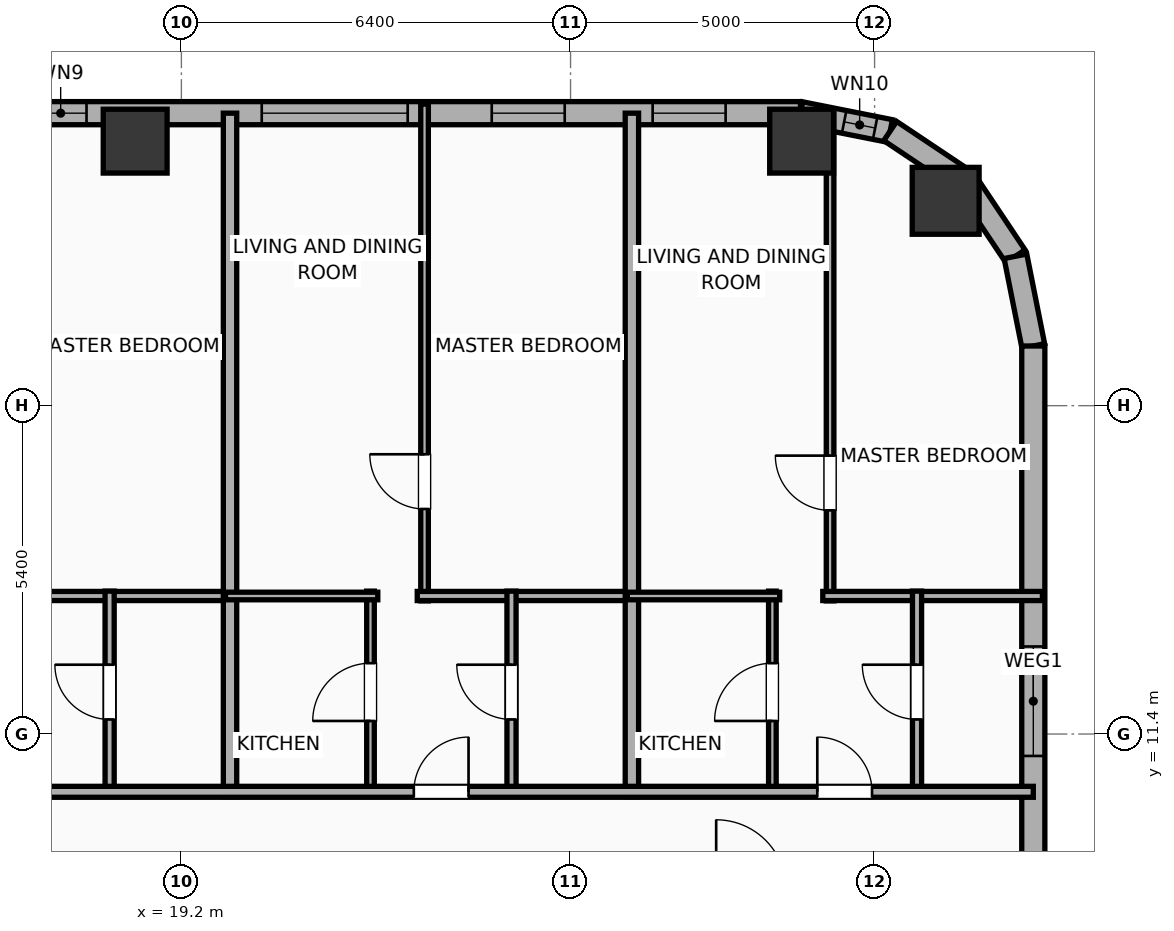
"""IFC4 building model, lengths in metres.
Left out: names, types, materials, properties, quantities, classifications, styles, units other than length and angle.
Written with IfcOpenShell. Run it as: python <this file> out.ifc"""

import sys

from ifc_helpers import new_model, si_unit, direction, frame, frame_2d, origin, origin_2d, place, context, subcontext, project, spatial, rectangle, hollow_rectangle, hollow_circle, extrude, element, fill, save


model = new_model("IFC4")
c1 = context("Model", 3, precision=1e-05, world=origin(), true_north=direction((0.0, 1.0)))
c2 = subcontext(c1, "Body", "Model", "MODEL_VIEW")
j1 = project(units=[si_unit("LENGTHUNIT", "METRE"), si_unit("PLANEANGLEUNIT", "RADIAN")], contexts=[c1])
p1 = place(None, origin())
s1 = spatial("IfcSite", under=j1, at=p1, CompositionType="ELEMENT")
p2 = place(p1, origin())
s2 = spatial("IfcBuilding", under=s1, at=p2, CompositionType="ELEMENT")
p3 = place(p2, frame((0.0, 0.0, 117.0)))
s3 = spatial("IfcBuildingStorey", under=s2, at=p3, CompositionType="ELEMENT", Elevation=117.0)
p4 = place(p3, frame((31.769, 20.169, 0.0), z_axis=(0.0, 0.0, 1.0), x_axis=(1.0, 0.0, 0.0)))
e1 = element("IfcColumn", 1, at=p4, inside=s3, PredefinedType="COLUMN", context=c2, shape_type="SweptSolid", body=[
    extrude(hollow_circle(Radius=0.55, WallThickness=0.036, at=origin_2d()), origin(), (0.0, 0.0, 1.0), 3.9),
])
for number, where, z_axis, x_axis in (
    (2, (29.4, 21.15, 0.0), (0.0, 0.0, 1.0), (1.0, 0.0, 0.0)),
    (3, (18.44, 21.15, 0.0), (0.0, 0.0, 1.0), (1.0, 0.0, 0.0)),
):
    element("IfcColumn", number, at=place(p3, frame(where, z_axis=z_axis, x_axis=x_axis)), inside=s3, PredefinedType="COLUMN", context=c2, shape_type="SweptSolid", body=[
        extrude(hollow_rectangle(XDim=1.05, YDim=1.05, WallThickness=0.036, at=origin_2d()), origin(), (0.0, 0.0, 1.0), 3.9),
    ])
p5 = place(p3, frame((10.762, 21.61, 0.0), z_axis=(0.0, 0.0, 1.0), x_axis=(1.0, 0.0, 0.0)))
e4 = element("IfcWall", 4, at=p5, inside=s3, PredefinedType="ELEMENTEDWALL", context=c2, shape_type="SweptSolid", body=[
    extrude(rectangle(XDim=18.619, YDim=0.38, at=frame_2d((9.31, 0.0))), origin(), (0.0, 0.0, 1.0), 3.65),
])
p6 = place(p5, frame((9.76, 0.0, 0.75)))
e5 = element("IfcOpeningElement", 5, at=p6, cuts=e4, PredefinedType="OPENING", context=c2, shape_type="SweptSolid", body=[
    extrude(rectangle(XDim=2.4, YDim=2.1, at=frame_2d((1.2, 1.05))), frame((0.0, 0.2, 0.0), z_axis=(0.0, -1.0, 0.0), x_axis=(1.0, 0.0, 0.0)), (0.0, 0.0, 1.0), 0.4),
])
p7 = place(p5, frame((2.952, 0.0, 0.75)))
e6 = element("IfcOpeningElement", 6, at=p7, cuts=e4, PredefinedType="OPENING", context=c2, shape_type="SweptSolid", body=[
    extrude(rectangle(XDim=1.2, YDim=2.05, at=frame_2d((0.6, 1.025))), frame((0.0, 0.2, 0.0), z_axis=(0.0, -1.0, 0.0), x_axis=(1.0, 0.0, 0.0)), (0.0, 0.0, 1.0), 0.4),
])
p8 = place(p5, frame((6.028, 0.0, 0.75)))
e7 = element("IfcOpeningElement", 7, at=p8, cuts=e4, PredefinedType="OPENING", context=c2, shape_type="SweptSolid", body=[
    extrude(rectangle(XDim=0.85, YDim=2.05, at=frame_2d((0.425, 1.025))), frame((0.0, 0.2, 0.0), z_axis=(0.0, -1.0, 0.0), x_axis=(1.0, 0.0, 0.0)), (0.0, 0.0, 1.0), 0.4),
])
p9 = place(p5, frame((13.542, 0.0, 0.75)))
e8 = element("IfcOpeningElement", 8, at=p9, cuts=e4, PredefinedType="OPENING", context=c2, shape_type="SweptSolid", body=[
    extrude(rectangle(XDim=1.2, YDim=2.05, at=frame_2d((0.6, 1.025))), frame((0.0, 0.2, 0.0), z_axis=(0.0, -1.0, 0.0), x_axis=(1.0, 0.0, 0.0)), (0.0, 0.0, 1.0), 0.4),
])
p10 = place(p5, frame((16.188, 0.0, 0.75)))
e9 = element("IfcOpeningElement", 9, at=p10, cuts=e4, PredefinedType="OPENING", context=c2, shape_type="SweptSolid", body=[
    extrude(rectangle(XDim=1.2, YDim=2.05, at=frame_2d((0.6, 1.025))), frame((0.0, 0.2, 0.0), z_axis=(0.0, -1.0, 0.0), x_axis=(1.0, 0.0, 0.0)), (0.0, 0.0, 1.0), 0.4),
])
p11 = place(p3, frame((29.381, 21.61, 0.0), z_axis=(0.0, 0.0, 1.0), x_axis=(0.980755066645, -0.195242155415, 0.0)))
e10 = element("IfcWall", 10, at=p11, inside=s3, PredefinedType="ELEMENTEDWALL", context=c2, shape_type="SweptSolid", body=[
    extrude(rectangle(XDim=1.504, YDim=0.38, at=frame_2d((0.752, 0.0))), origin(), (0.0, 0.0, 1.0), 3.65),
])
p12 = place(p11, frame((0.732, 0.0, 0.75)))
e11 = element("IfcOpeningElement", 11, at=p12, cuts=e10, PredefinedType="OPENING", context=c2, shape_type="SweptSolid", body=[
    extrude(rectangle(XDim=0.52, YDim=2.05, at=frame_2d((0.26, 1.025))), frame((0.0, 0.2, 0.0), z_axis=(0.0, -1.0, 0.0), x_axis=(1.0, 0.0, 0.0)), (0.0, 0.0, 1.0), 0.4),
])
p13 = place(p3, frame((30.857, 21.316, 0.0), z_axis=(0.0, 0.0, 1.0), x_axis=(0.831468045563, -0.555572577804, 0.0)))
e12 = element("IfcWall", 12, at=p13, inside=s3, PredefinedType="ELEMENTEDWALL", context=c2, shape_type="SweptSolid", body=[
    extrude(rectangle(XDim=1.485, YDim=0.38, at=frame_2d((0.742, 0.0))), origin(), (0.0, 0.0, 1.0), 3.65),
])
p14 = place(p3, frame((32.091, 20.491, 0.0), z_axis=(0.0, 0.0, 1.0), x_axis=(0.555610286119, -0.831442848281, 0.0)))
e13 = element("IfcWall", 13, at=p14, inside=s3, PredefinedType="ELEMENTEDWALL", context=c2, shape_type="SweptSolid", body=[
    extrude(rectangle(XDim=1.485, YDim=0.38, at=frame_2d((0.743, 0.0))), origin(), (0.0, 0.0, 1.0), 3.65),
])
p15 = place(p3, frame((32.917, 19.257, 0.0), z_axis=(0.0, 0.0, 1.0), x_axis=(0.195086038585, -0.980786132421, 0.0)))
e14 = element("IfcWall", 14, at=p15, inside=s3, PredefinedType="ELEMENTEDWALL", context=c2, shape_type="SweptSolid", body=[
    extrude(rectangle(XDim=1.504, YDim=0.38, at=frame_2d((0.752, 0.0))), origin(), (0.0, 0.0, 1.0), 3.65),
])
p16 = place(p3, frame((33.21, 17.781, 0.0), z_axis=(0.0, 0.0, 1.0), x_axis=(0.0, -1.0, 0.0)))
e15 = element("IfcWall", 15, at=p16, inside=s3, PredefinedType="ELEMENTEDWALL", context=c2, shape_type="SweptSolid", body=[
    extrude(rectangle(XDim=11.683, YDim=0.38, at=frame_2d((5.842, 0.0))), origin(), (0.0, 0.0, 1.0), 3.65),
])
p17 = place(p16, frame((4.942, 0.0, 0.75)))
e16 = element("IfcOpeningElement", 16, at=p17, cuts=e15, PredefinedType="OPENING", context=c2, shape_type="SweptSolid", body=[
    extrude(rectangle(XDim=1.8, YDim=2.1, at=frame_2d((0.9, 1.05))), frame((0.0, 0.2, 0.0), z_axis=(0.0, -1.0, 0.0), x_axis=(1.0, 0.0, 0.0)), (0.0, 0.0, 1.0), 0.4),
])
p18 = place(p3, frame((16.47, 13.67, 0.0), z_axis=(0.0, 0.0, 1.0), x_axis=(1.0, 0.0, 0.0)))
e17 = element("IfcWall", 17, at=p18, inside=s3, PredefinedType="PLUMBINGWALL", context=c2, shape_type="SweptSolid", body=[
    extrude(rectangle(XDim=3.605, YDim=0.15, at=frame_2d((1.802, 0.0))), origin(), (0.0, 0.0, 1.0), 3.65),
])
p19 = place(p3, frame((18.02, 10.43, 0.0), z_axis=(0.0, 0.0, 1.0), x_axis=(0.0, 1.0, 0.0)))
e18 = element("IfcWall", 18, at=p19, inside=s3, PredefinedType="PLUMBINGWALL", context=c2, shape_type="SweptSolid", body=[
    extrude(rectangle(XDim=3.32, YDim=0.15, at=frame_2d((1.66, 0.0))), origin(), (0.0, 0.0, 1.0), 3.65),
])
p20 = place(p19, frame((1.21, 0.0, 0.0)))
e19 = element("IfcOpeningElement", 19, at=p20, cuts=e18, PredefinedType="OPENING", context=c2, shape_type="SweptSolid", body=[
    extrude(rectangle(XDim=0.9, YDim=2.05, at=frame_2d((0.45, 1.025))), frame((0.0, 0.085, 0.0), z_axis=(0.0, -1.0, 0.0), x_axis=(1.0, 0.0, 0.0)), (0.0, 0.0, 1.0), 0.17),
])
p21 = place(p3, frame((20.0, 10.37, 0.0), z_axis=(0.0, 0.0, 1.0), x_axis=(0.0, 1.0, 0.0)))
e20 = element("IfcWall", 20, at=p21, inside=s3, PredefinedType="PARTITIONING", context=c2, shape_type="SweptSolid", body=[
    extrude(rectangle(XDim=11.24, YDim=0.22, at=frame_2d((5.62, 0.0))), origin(), (0.0, 0.0, 1.0), 3.65),
])
p22 = place(p3, frame((23.199, 13.59, 0.0), z_axis=(0.0, 0.0, 1.0), x_axis=(0.0, 1.0, 0.0)))
e21 = element("IfcWall", 21, at=p22, inside=s3, PredefinedType="PARTITIONING", context=c2, shape_type="SweptSolid", body=[
    extrude(rectangle(XDim=8.17, YDim=0.125, at=frame_2d((4.085, 0.0))), origin(), (0.0, 0.0, 1.0), 3.65),
])
p23 = place(p22, frame((1.511, 0.0, 0.0)))
e22 = element("IfcOpeningElement", 22, at=p23, cuts=e21, PredefinedType="OPENING", context=c2, shape_type="SweptSolid", body=[
    extrude(rectangle(XDim=0.9, YDim=2.05, at=frame_2d((0.45, 1.025))), frame((0.0, 0.073, 0.0), z_axis=(0.0, -1.0, 0.0), x_axis=(1.0, 0.0, 0.0)), (0.0, 0.0, 1.0), 0.145),
])
p24 = place(p3, frame((23.079, 13.67, 0.0), z_axis=(0.0, 0.0, 1.0), x_axis=(1.0, 0.0, 0.0)))
e23 = element("IfcWall", 23, at=p24, inside=s3, PredefinedType="PLUMBINGWALL", context=c2, shape_type="SweptSolid", body=[
    extrude(rectangle(XDim=3.605, YDim=0.15, at=frame_2d((1.802, 0.0))), origin(), (0.0, 0.0, 1.0), 3.65),
])
p25 = place(p3, frame((22.31, 10.43, 0.0), z_axis=(0.0, 0.0, 1.0), x_axis=(0.0, 1.0, 0.0)))
e24 = element("IfcWall", 24, at=p25, inside=s3, PredefinedType="PARTITIONING", context=c2, shape_type="SweptSolid", body=[
    extrude(rectangle(XDim=3.32, YDim=0.125, at=frame_2d((1.66, 0.0))), origin(), (0.0, 0.0, 1.0), 3.65),
])
p26 = place(p25, frame((1.185, 0.0, 0.0)))
e25 = element("IfcOpeningElement", 25, at=p26, cuts=e24, PredefinedType="OPENING", context=c2, shape_type="SweptSolid", body=[
    extrude(rectangle(XDim=0.95, YDim=2.05, at=frame_2d((0.475, 1.025))), frame((0.0, 0.073, 0.0), z_axis=(0.0, -1.0, 0.0), x_axis=(1.0, 0.0, 0.0)), (0.0, 0.0, 1.0), 0.145),
])
p27 = place(p3, frame((19.925, 13.67, 0.0), z_axis=(0.0, 0.0, 1.0), x_axis=(1.0, 0.0, 0.0)))
e26 = element("IfcWall", 26, at=p27, inside=s3, PredefinedType="PARTITIONING", context=c2, shape_type="SweptSolid", body=[
    extrude(rectangle(XDim=2.505, YDim=0.125, at=frame_2d((1.252, 0.0))), origin(), (0.0, 0.0, 1.0), 3.65),
])
p28 = place(p3, frame((24.629, 10.43, 0.0), z_axis=(0.0, 0.0, 1.0), x_axis=(0.0, 1.0, 0.0)))
e27 = element("IfcWall", 27, at=p28, inside=s3, PredefinedType="PLUMBINGWALL", context=c2, shape_type="SweptSolid", body=[
    extrude(rectangle(XDim=3.32, YDim=0.15, at=frame_2d((1.66, 0.0))), origin(), (0.0, 0.0, 1.0), 3.65),
])
p29 = place(p28, frame((1.21, 0.0, 0.0)))
e28 = element("IfcOpeningElement", 28, at=p29, cuts=e27, PredefinedType="OPENING", context=c2, shape_type="SweptSolid", body=[
    extrude(rectangle(XDim=0.9, YDim=2.05, at=frame_2d((0.45, 1.025))), frame((0.0, 0.085, 0.0), z_axis=(0.0, -1.0, 0.0), x_axis=(1.0, 0.0, 0.0)), (0.0, 0.0, 1.0), 0.17),
])
p30 = place(p3, frame((26.609, 10.37, 0.0), z_axis=(0.0, 0.0, 1.0), x_axis=(0.0, 1.0, 0.0)))
e29 = element("IfcWall", 29, at=p30, inside=s3, PredefinedType="PARTITIONING", context=c2, shape_type="SweptSolid", body=[
    extrude(rectangle(XDim=11.24, YDim=0.22, at=frame_2d((5.62, 0.0))), origin(), (0.0, 0.0, 1.0), 3.65),
])
p31 = place(p3, frame((29.868, 13.59, 0.0), z_axis=(0.0, 0.0, 1.0), x_axis=(0.0, 1.0, 0.0)))
e30 = element("IfcWall", 30, at=p31, inside=s3, PredefinedType="PARTITIONING", context=c2, shape_type="SweptSolid", body=[
    extrude(rectangle(XDim=8.076, YDim=0.125, at=frame_2d((4.038, 0.0))), origin(), (0.0, 0.0, 1.0), 3.65),
])
p32 = place(p31, frame((1.488, 0.0, 0.0)))
e31 = element("IfcOpeningElement", 31, at=p32, cuts=e30, PredefinedType="OPENING", context=c2, shape_type="SweptSolid", body=[
    extrude(rectangle(XDim=0.9, YDim=2.05, at=frame_2d((0.45, 1.025))), frame((0.0, 0.073, 0.0), z_axis=(0.0, -1.0, 0.0), x_axis=(1.0, 0.0, 0.0)), (0.0, 0.0, 1.0), 0.145),
])
p33 = place(p3, frame((29.748, 13.67, 0.0), z_axis=(0.0, 0.0, 1.0), x_axis=(1.0, 0.0, 0.0)))
e32 = element("IfcWall", 32, at=p33, inside=s3, PredefinedType="PLUMBINGWALL", context=c2, shape_type="SweptSolid", body=[
    extrude(rectangle(XDim=3.612, YDim=0.15, at=frame_2d((1.806, 0.0))), origin(), (0.0, 0.0, 1.0), 3.65),
])
p34 = place(p3, frame((28.919, 10.43, 0.0), z_axis=(0.0, 0.0, 1.0), x_axis=(0.0, 1.0, 0.0)))
e33 = element("IfcWall", 33, at=p34, inside=s3, PredefinedType="PARTITIONING", context=c2, shape_type="SweptSolid", body=[
    extrude(rectangle(XDim=3.32, YDim=0.125, at=frame_2d((1.66, 0.0))), origin(), (0.0, 0.0, 1.0), 3.65),
])
p35 = place(p34, frame((1.185, 0.0, 0.0)))
e34 = element("IfcOpeningElement", 34, at=p35, cuts=e33, PredefinedType="OPENING", context=c2, shape_type="SweptSolid", body=[
    extrude(rectangle(XDim=0.95, YDim=2.05, at=frame_2d((0.475, 1.025))), frame((0.0, 0.073, 0.0), z_axis=(0.0, -1.0, 0.0), x_axis=(1.0, 0.0, 0.0)), (0.0, 0.0, 1.0), 0.145),
])
p36 = place(p3, frame((26.534, 13.67, 0.0), z_axis=(0.0, 0.0, 1.0), x_axis=(1.0, 0.0, 0.0)))
e35 = element("IfcWall", 35, at=p36, inside=s3, PredefinedType="PARTITIONING", context=c2, shape_type="SweptSolid", body=[
    extrude(rectangle(XDim=2.505, YDim=0.125, at=frame_2d((1.252, 0.0))), origin(), (0.0, 0.0, 1.0), 3.65),
])
p37 = place(p3, frame((31.298, 10.43, 0.0), z_axis=(0.0, 0.0, 1.0), x_axis=(0.0, 1.0, 0.0)))
e36 = element("IfcWall", 36, at=p37, inside=s3, PredefinedType="PLUMBINGWALL", context=c2, shape_type="SweptSolid", body=[
    extrude(rectangle(XDim=3.32, YDim=0.15, at=frame_2d((1.66, 0.0))), origin(), (0.0, 0.0, 1.0), 3.65),
])
p38 = place(p37, frame((1.21, 0.0, 0.0)))
e37 = element("IfcOpeningElement", 37, at=p38, cuts=e36, PredefinedType="OPENING", context=c2, shape_type="SweptSolid", body=[
    extrude(rectangle(XDim=0.9, YDim=2.05, at=frame_2d((0.45, 1.025))), frame((0.0, 0.085, 0.0), z_axis=(0.0, -1.0, 0.0), x_axis=(1.0, 0.0, 0.0)), (0.0, 0.0, 1.0), 0.17),
])
p39 = place(p3, frame((-29.21, 10.45, 0.0), z_axis=(0.0, 0.0, 1.0), x_axis=(1.0, 0.0, 0.0)))
e38 = element("IfcWall", 38, at=p39, inside=s3, PredefinedType="PARTITIONING", context=c2, shape_type="SweptSolid", body=[
    extrude(rectangle(XDim=62.42, YDim=0.18, at=frame_2d((31.21, 0.0))), origin(), (0.0, 0.0, 1.0), 3.65),
])
p40 = place(p39, frame((3.083, 0.0, 0.0)))
e39 = element("IfcOpeningElement", 39, at=p40, cuts=e38, PredefinedType="OPENING", context=c2, shape_type="SweptSolid", body=[
    extrude(rectangle(XDim=0.9, YDim=2.05, at=frame_2d((0.45, 1.025))), frame((0.0, 0.1, 0.0), z_axis=(0.0, -1.0, 0.0), x_axis=(1.0, 0.0, 0.0)), (0.0, 0.0, 1.0), 0.2),
])
p41 = place(p39, frame((12.052, 0.0, 0.0)))
e40 = element("IfcOpeningElement", 40, at=p41, cuts=e38, PredefinedType="OPENING", context=c2, shape_type="SweptSolid", body=[
    extrude(rectangle(XDim=1.15, YDim=2.05, at=frame_2d((0.575, 1.025))), frame((0.0, 0.1, 0.0), z_axis=(0.0, -1.0, 0.0), x_axis=(1.0, 0.0, 0.0)), (0.0, 0.0, 1.0), 0.2),
])
p42 = place(p39, frame((22.558, 0.0, 0.0)))
e41 = element("IfcOpeningElement", 41, at=p42, cuts=e38, PredefinedType="OPENING", context=c2, shape_type="SweptSolid", body=[
    extrude(rectangle(XDim=1.15, YDim=2.05, at=frame_2d((0.575, 1.025))), frame((0.0, 0.1, 0.0), z_axis=(0.0, -1.0, 0.0), x_axis=(1.0, 0.0, 0.0)), (0.0, 0.0, 1.0), 0.2),
])
p43 = place(p39, frame((33.219, 0.0, 0.0)))
e42 = element("IfcOpeningElement", 42, at=p43, cuts=e38, PredefinedType="OPENING", context=c2, shape_type="SweptSolid", body=[
    extrude(rectangle(XDim=1.15, YDim=2.05, at=frame_2d((0.575, 1.025))), frame((0.0, 0.1, 0.0), z_axis=(0.0, -1.0, 0.0), x_axis=(1.0, 0.0, 0.0)), (0.0, 0.0, 1.0), 0.2),
])
p44 = place(p39, frame((43.725, 0.0, 0.0)))
e43 = element("IfcOpeningElement", 43, at=p44, cuts=e38, PredefinedType="OPENING", context=c2, shape_type="SweptSolid", body=[
    extrude(rectangle(XDim=1.15, YDim=2.05, at=frame_2d((0.575, 1.025))), frame((0.0, 0.1, 0.0), z_axis=(0.0, -1.0, 0.0), x_axis=(1.0, 0.0, 0.0)), (0.0, 0.0, 1.0), 0.2),
])
p45 = place(p39, frame((52.232, 0.0, 0.0)))
e44 = element("IfcOpeningElement", 44, at=p45, cuts=e38, PredefinedType="OPENING", context=c2, shape_type="SweptSolid", body=[
    extrude(rectangle(XDim=0.9, YDim=2.05, at=frame_2d((0.45, 1.025))), frame((0.0, 0.1, 0.0), z_axis=(0.0, -1.0, 0.0), x_axis=(1.0, 0.0, 0.0)), (0.0, 0.0, 1.0), 0.2),
])
p46 = place(p39, frame((58.868, 0.0, 0.0)))
e45 = element("IfcOpeningElement", 45, at=p46, cuts=e38, PredefinedType="OPENING", context=c2, shape_type="SweptSolid", body=[
    extrude(rectangle(XDim=0.9, YDim=2.05, at=frame_2d((0.45, 1.025))), frame((0.0, 0.1, 0.0), z_axis=(0.0, -1.0, 0.0), x_axis=(1.0, 0.0, 0.0)), (0.0, 0.0, 1.0), 0.2),
])
p47 = place(p6, origin())
e46 = element("IfcWindow", 46, at=p47, inside=s3, PartitioningType="SINGLE_PANEL", PredefinedType="WINDOW", context=c2, shape_type="SweptSolid", body=[
    extrude(rectangle(XDim=2.4, YDim=2.1, at=frame_2d((1.2, 1.05))), frame((0.0, 0.03, 0.0), z_axis=(0.0, -1.0, 0.0), x_axis=(1.0, 0.0, 0.0)), (0.0, 0.0, 1.0), 0.06),
])
fill(e5, e46)
p48 = place(p17, origin())
e47 = element("IfcWindow", 47, at=p48, inside=s3, PartitioningType="SINGLE_PANEL", PredefinedType="WINDOW", context=c2, shape_type="SweptSolid", body=[
    extrude(rectangle(XDim=1.8, YDim=2.1, at=frame_2d((0.9, 1.05))), frame((0.0, 0.03, 0.0), z_axis=(0.0, -1.0, 0.0), x_axis=(1.0, 0.0, 0.0)), (0.0, 0.0, 1.0), 0.06),
])
fill(e16, e47)
p49 = place(p8, origin())
e48 = element("IfcWindow", 48, at=p49, inside=s3, PartitioningType="SINGLE_PANEL", PredefinedType="WINDOW", context=c2, shape_type="SweptSolid", body=[
    extrude(rectangle(XDim=0.85, YDim=2.05, at=frame_2d((0.425, 1.025))), frame((0.0, 0.03, 0.0), z_axis=(0.0, -1.0, 0.0), x_axis=(1.0, 0.0, 0.0)), (0.0, 0.0, 1.0), 0.06),
])
fill(e7, e48)
p50 = place(p9, origin())
e49 = element("IfcWindow", 49, at=p50, inside=s3, PartitioningType="SINGLE_PANEL", PredefinedType="WINDOW", context=c2, shape_type="SweptSolid", body=[
    extrude(rectangle(XDim=1.2, YDim=2.05, at=frame_2d((0.6, 1.025))), frame((0.0, 0.03, 0.0), z_axis=(0.0, -1.0, 0.0), x_axis=(1.0, 0.0, 0.0)), (0.0, 0.0, 1.0), 0.06),
])
fill(e8, e49)
p51 = place(p10, origin())
e50 = element("IfcWindow", 50, at=p51, inside=s3, PartitioningType="SINGLE_PANEL", PredefinedType="WINDOW", context=c2, shape_type="SweptSolid", body=[
    extrude(rectangle(XDim=1.2, YDim=2.05, at=frame_2d((0.6, 1.025))), frame((0.0, 0.03, 0.0), z_axis=(0.0, -1.0, 0.0), x_axis=(1.0, 0.0, 0.0)), (0.0, 0.0, 1.0), 0.06),
])
fill(e9, e50)
p52 = place(p12, origin())
e51 = element("IfcWindow", 51, at=p52, inside=s3, PartitioningType="SINGLE_PANEL", PredefinedType="WINDOW", context=c2, shape_type="SweptSolid", body=[
    extrude(rectangle(XDim=0.52, YDim=2.05, at=frame_2d((0.26, 1.025))), frame((0.0, 0.03, 0.0), z_axis=(0.0, -1.0, 0.0), x_axis=(1.0, 0.0, 0.0)), (0.0, 0.0, 1.0), 0.06),
])
fill(e11, e51)
p53 = place(p20, origin())
e52 = element("IfcDoor", 52, at=p53, inside=s3, OperationType="SINGLE_SWING_RIGHT", PredefinedType="DOOR", context=c2, shape_type="SweptSolid", body=[
    extrude(rectangle(XDim=0.9, YDim=2.05, at=frame_2d((0.45, 1.025))), frame((0.0, 0.025, 0.0), z_axis=(0.0, -1.0, 0.0), x_axis=(1.0, 0.0, 0.0)), (0.0, 0.0, 1.0), 0.05),
])
fill(e19, e52)
p54 = place(p23, origin())
e53 = element("IfcDoor", 53, at=p54, inside=s3, OperationType="SINGLE_SWING_RIGHT", PredefinedType="DOOR", context=c2, shape_type="SweptSolid", body=[
    extrude(rectangle(XDim=0.9, YDim=2.05, at=frame_2d((0.45, 1.025))), frame((0.0, 0.025, 0.0), z_axis=(0.0, -1.0, 0.0), x_axis=(1.0, 0.0, 0.0)), (0.0, 0.0, 1.0), 0.05),
])
fill(e22, e53)
p55 = place(p26, origin())
e54 = element("IfcDoor", 54, at=p55, inside=s3, OperationType="SINGLE_SWING_LEFT", PredefinedType="DOOR", context=c2, shape_type="SweptSolid", body=[
    extrude(rectangle(XDim=0.95, YDim=2.05, at=frame_2d((0.475, 1.025))), frame((0.0, 0.025, 0.0), z_axis=(0.0, -1.0, 0.0), x_axis=(1.0, 0.0, 0.0)), (0.0, 0.0, 1.0), 0.05),
])
fill(e25, e54)
p56 = place(p29, origin())
e55 = element("IfcDoor", 55, at=p56, inside=s3, OperationType="SINGLE_SWING_RIGHT", PredefinedType="DOOR", context=c2, shape_type="SweptSolid", body=[
    extrude(rectangle(XDim=0.9, YDim=2.05, at=frame_2d((0.45, 1.025))), frame((0.0, 0.025, 0.0), z_axis=(0.0, -1.0, 0.0), x_axis=(1.0, 0.0, 0.0)), (0.0, 0.0, 1.0), 0.05),
])
fill(e28, e55)
p57 = place(p32, origin())
e56 = element("IfcDoor", 56, at=p57, inside=s3, OperationType="SINGLE_SWING_RIGHT", PredefinedType="DOOR", context=c2, shape_type="SweptSolid", body=[
    extrude(rectangle(XDim=0.9, YDim=2.05, at=frame_2d((0.45, 1.025))), frame((0.0, 0.025, 0.0), z_axis=(0.0, -1.0, 0.0), x_axis=(1.0, 0.0, 0.0)), (0.0, 0.0, 1.0), 0.05),
])
fill(e31, e56)
p58 = place(p35, origin())
e57 = element("IfcDoor", 57, at=p58, inside=s3, OperationType="SINGLE_SWING_LEFT", PredefinedType="DOOR", context=c2, shape_type="SweptSolid", body=[
    extrude(rectangle(XDim=0.95, YDim=2.05, at=frame_2d((0.475, 1.025))), frame((0.0, 0.025, 0.0), z_axis=(0.0, -1.0, 0.0), x_axis=(1.0, 0.0, 0.0)), (0.0, 0.0, 1.0), 0.05),
])
fill(e34, e57)
p59 = place(p38, origin())
e58 = element("IfcDoor", 58, at=p59, inside=s3, OperationType="SINGLE_SWING_RIGHT", PredefinedType="DOOR", context=c2, shape_type="SweptSolid", body=[
    extrude(rectangle(XDim=0.9, YDim=2.05, at=frame_2d((0.45, 1.025))), frame((0.0, 0.025, 0.0), z_axis=(0.0, -1.0, 0.0), x_axis=(1.0, 0.0, 0.0)), (0.0, 0.0, 1.0), 0.05),
])
fill(e37, e58)
p60 = place(p45, origin())
e59 = element("IfcDoor", 59, at=p60, inside=s3, OperationType="SINGLE_SWING_RIGHT", PredefinedType="DOOR", context=c2, shape_type="SweptSolid", body=[
    extrude(rectangle(XDim=0.9, YDim=2.05, at=frame_2d((0.45, 1.025))), frame((0.0, 0.025, 0.0), z_axis=(0.0, -1.0, 0.0), x_axis=(1.0, 0.0, 0.0)), (0.0, 0.0, 1.0), 0.05),
])
fill(e44, e59)
p61 = place(p46, origin())
e60 = element("IfcDoor", 60, at=p61, inside=s3, OperationType="SINGLE_SWING_LEFT", PredefinedType="DOOR", context=c2, shape_type="SweptSolid", body=[
    extrude(rectangle(XDim=0.9, YDim=2.05, at=frame_2d((0.45, 1.025))), frame((0.0, 0.025, 0.0), z_axis=(0.0, -1.0, 0.0), x_axis=(1.0, 0.0, 0.0)), (0.0, 0.0, 1.0), 0.05),
])
fill(e45, e60)
save(model, sys.argv[1])
